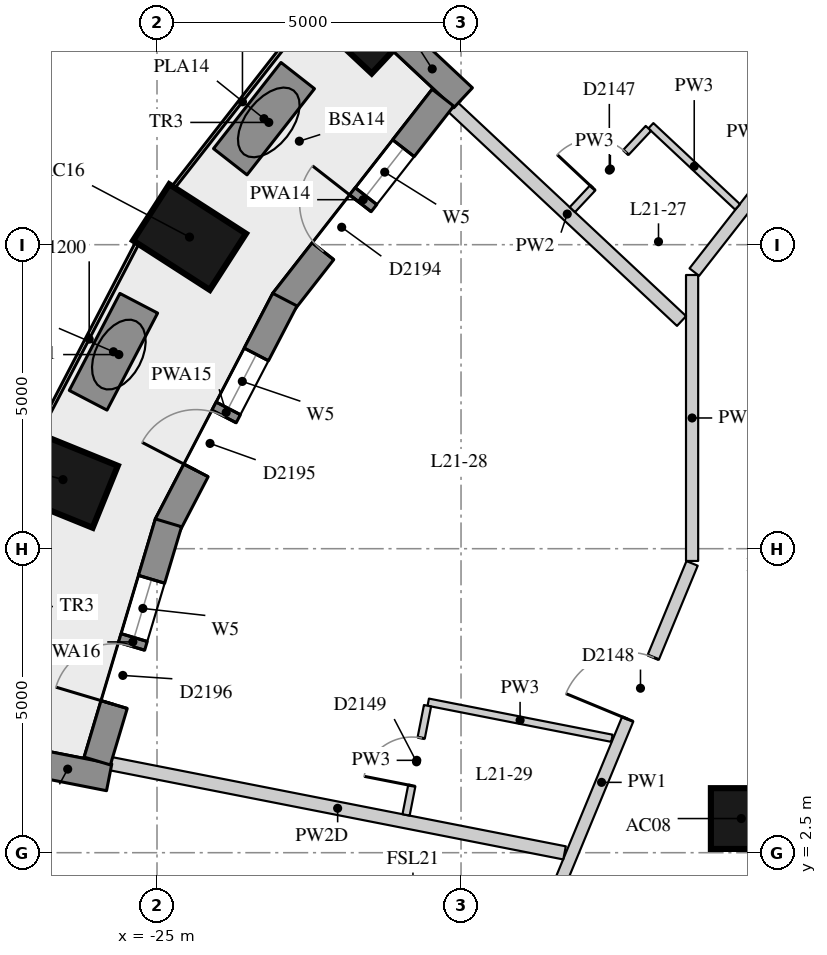
"""IFC4 building model, lengths in metres.
Left out: names, types, materials, properties, quantities, classifications, styles, units other than length and angle.
Written with IfcOpenShell. Run it as: python <this file> out.ifc"""

import sys

from ifc_helpers import new_model, si_unit, direction, frame, frame_2d, origin, origin_2d, place, context, subcontext, project, spatial, rectangle, extrude, element, fill, save


model = new_model("IFC4")
c1 = context("Model", 3, precision=1e-05, world=origin(), true_north=direction((0.0, 1.0)))
c2 = subcontext(c1, "Body", "Model", "MODEL_VIEW")
j1 = project(units=[si_unit("LENGTHUNIT", "METRE"), si_unit("PLANEANGLEUNIT", "RADIAN")], contexts=[c1])
p1 = place(None, origin())
s1 = spatial("IfcSite", under=j1, at=p1, CompositionType="ELEMENT")
p2 = place(p1, origin())
s2 = spatial("IfcBuilding", under=s1, at=p2, CompositionType="ELEMENT")
p3 = place(p2, frame((0.0, 0.0, 77.8)))
s3 = spatial("IfcBuildingStorey", under=s2, at=p3, CompositionType="ELEMENT", Elevation=77.8)
for number, where, z_axis, x_axis in (
    (1, (-21.641, 16.23, 0.0), (0.0, 0.0, 1.0), (-0.73, 0.683, 0.0)),
    (2, (-24.465, 12.625, 0.0), (0.0, 0.0, 1.0), (-0.841, 0.541, 0.0)),
    (3, (-26.546, 8.636, 0.0), (0.0, 0.0, 1.0), (-0.927, 0.376, 0.0)),
):
    element("IfcColumn", number, at=place(p3, frame(where, z_axis=z_axis, x_axis=x_axis)), inside=s3, PredefinedType="COLUMN", context=c2, shape_type="SweptSolid", body=[
        extrude(rectangle(XDim=1.5, YDim=1.1, at=origin_2d()), origin(), (0.0, 0.0, 1.0), 3.3),
    ])
p4 = place(p3, frame((-15.391, 3.062, 0.0), z_axis=(0.0, 0.0, 1.0), x_axis=(1.0, 0.0, 0.0)))
e4 = element("IfcColumn", 4, at=p4, inside=s3, PredefinedType="COLUMN", context=c2, shape_type="SweptSolid", body=[
    extrude(rectangle(XDim=1.0, YDim=1.0, at=origin_2d()), origin(), (0.0, 0.0, 1.0), 3.3),
])
p5 = place(p3, frame((-20.982, 15.866, 0.0), z_axis=(0.0, 0.0, 1.0), x_axis=(0.730062381614, -0.683380508174, 0.0)))
e5 = element("IfcWall", 5, at=p5, inside=s3, PredefinedType="SOLIDWALL", context=c2, shape_type="SweptSolid", body=[
    extrude(rectangle(XDim=1.391, YDim=0.45, at=frame_2d((0.696, 0.0))), origin(), (0.0, 0.0, 1.0), 3.02),
])
p6 = place(p3, frame((-27.151, 4.009, 0.0), z_axis=(0.0, 0.0, 1.0), x_axis=(0.981197182729, -0.1930080014, 0.0)))
e6 = element("IfcWall", 6, at=p6, inside=s3, PredefinedType="SOLIDWALL", context=c2, shape_type="SweptSolid", body=[
    extrude(rectangle(XDim=1.39, YDim=0.45, at=frame_2d((0.695, 0.0))), origin(), (0.0, 0.0, 1.0), 2.47),
])
p7 = place(p3, frame((-20.298, 14.918, 0.0), z_axis=(0.0, 0.0, 1.0), x_axis=(-0.615578403957, -0.788075649022, 0.0)))
e7 = element("IfcWall", 7, at=p7, inside=s3, PredefinedType="SOLIDWALL", context=c2, shape_type="SweptSolid", body=[
    extrude(rectangle(XDim=4.259, YDim=0.45, at=frame_2d((2.129, 0.0))), origin(), (0.0, 0.0, 1.0), 3.02),
])
p8 = place(p7, frame((1.054, 0.0, 0.4)))
e8 = element("IfcOpeningElement", 8, at=p8, cuts=e7, PredefinedType="OPENING", context=c2, shape_type="SweptSolid", body=[
    extrude(rectangle(XDim=1.0, YDim=1.75, at=frame_2d((0.5, 0.875))), frame((0.0, 0.235, 0.0), z_axis=(0.0, -1.0, 0.0), x_axis=(1.0, 0.0, 0.0)), (0.0, 0.0, 1.0), 0.47),
])
p9 = place(p7, frame((2.204, 0.0, 0.0)))
e9 = element("IfcOpeningElement", 9, at=p9, cuts=e7, PredefinedType="OPENING", context=c2, shape_type="SweptSolid", body=[
    extrude(rectangle(XDim=1.0, YDim=2.15, at=frame_2d((0.5, 1.075))), frame((0.0, 0.235, 0.0), z_axis=(0.0, -1.0, 0.0), x_axis=(1.0, 0.0, 0.0)), (0.0, 0.0, 1.0), 0.47),
])
p10 = place(p3, frame((-22.897, 11.597, 0.0), z_axis=(0.0, 0.0, 1.0), x_axis=(-0.461514453451, -0.887132689769, 0.0)))
e10 = element("IfcWall", 10, at=p10, inside=s3, PredefinedType="SOLIDWALL", context=c2, shape_type="SweptSolid", body=[
    extrude(rectangle(XDim=4.183, YDim=0.45, at=frame_2d((2.091, 0.0))), origin(), (0.0, 0.0, 1.0), 3.02),
])
p11 = place(p10, frame((1.016, 0.0, 0.4)))
e11 = element("IfcOpeningElement", 11, at=p11, cuts=e10, PredefinedType="OPENING", context=c2, shape_type="SweptSolid", body=[
    extrude(rectangle(XDim=1.0, YDim=1.75, at=frame_2d((0.5, 0.875))), frame((0.0, 0.235, 0.0), z_axis=(0.0, -1.0, 0.0), x_axis=(1.0, 0.0, 0.0)), (0.0, 0.0, 1.0), 0.47),
])
p12 = place(p10, frame((2.167, 0.0, 0.0)))
e12 = element("IfcOpeningElement", 12, at=p12, cuts=e10, PredefinedType="OPENING", context=c2, shape_type="SweptSolid", body=[
    extrude(rectangle(XDim=1.0, YDim=2.15, at=frame_2d((0.5, 1.075))), frame((0.0, 0.235, 0.0), z_axis=(0.0, -1.0, 0.0), x_axis=(1.0, 0.0, 0.0)), (0.0, 0.0, 1.0), 0.47),
])
p13 = place(p3, frame((-24.812, 7.925, 0.0), z_axis=(0.0, 0.0, 1.0), x_axis=(-0.286389028326, -0.95811341941, 0.0)))
e13 = element("IfcWall", 13, at=p13, inside=s3, PredefinedType="SOLIDWALL", context=c2, shape_type="SweptSolid", body=[
    extrude(rectangle(XDim=4.088, YDim=0.45, at=frame_2d((2.044, 0.0))), origin(), (0.0, 0.0, 1.0), 3.02),
])
p14 = place(p13, frame((0.969, 0.0, 0.4)))
e14 = element("IfcOpeningElement", 14, at=p14, cuts=e13, PredefinedType="OPENING", context=c2, shape_type="SweptSolid", body=[
    extrude(rectangle(XDim=1.0, YDim=1.75, at=frame_2d((0.5, 0.875))), frame((0.0, 0.235, 0.0), z_axis=(0.0, -1.0, 0.0), x_axis=(1.0, 0.0, 0.0)), (0.0, 0.0, 1.0), 0.47),
])
p15 = place(p13, frame((2.119, 0.0, 0.0)))
e15 = element("IfcOpeningElement", 15, at=p15, cuts=e13, PredefinedType="OPENING", context=c2, shape_type="SweptSolid", body=[
    extrude(rectangle(XDim=1.0, YDim=2.15, at=frame_2d((0.5, 1.075))), frame((0.0, 0.235, 0.0), z_axis=(0.0, -1.0, 0.0), x_axis=(1.0, 0.0, 0.0)), (0.0, 0.0, 1.0), 0.47),
])
p16 = place(p3, frame((-22.686, 15.281, 0.0), z_axis=(0.0, 0.0, 1.0), x_axis=(-0.616622746332, -0.787258781282, 0.0)))
e16 = element("IfcWall", 16, at=p16, inside=s3, PredefinedType="USERDEFINED", context=c2, shape_type="SweptSolid", body=[
    extrude(rectangle(XDim=1.8, YDim=0.7, at=frame_2d((0.9, 0.0))), origin(), (0.0, 0.0, 1.0), 0.75),
])
p17 = place(p3, frame((-25.3, 11.537, 0.0), z_axis=(0.0, 0.0, 1.0), x_axis=(-0.462501112253, -0.886618701114, 0.0)))
e17 = element("IfcWall", 17, at=p17, inside=s3, PredefinedType="USERDEFINED", context=c2, shape_type="SweptSolid", body=[
    extrude(rectangle(XDim=1.8, YDim=0.7, at=frame_2d((0.9, 0.0))), origin(), (0.0, 0.0, 1.0), 0.75),
])
p18 = place(p3, frame((-19.177, 0.056, 0.0), z_axis=(0.0, 0.0, 1.0), x_axis=(0.382011450526, 0.924157590277, 0.0)))
e18 = element("IfcWall", 18, at=p18, inside=s3, PredefinedType="PARTITIONING", context=c2, shape_type="SweptSolid", body=[
    extrude(rectangle(XDim=7.794, YDim=0.2, at=frame_2d((3.897, 0.0))), origin(), (0.0, 0.0, 1.0), 3.02),
])
p19 = place(p18, frame((5.022, 0.0, 0.0)))
e19 = element("IfcOpeningElement", 19, at=p19, cuts=e18, PredefinedType="OPENING", context=c2, shape_type="SweptSolid", body=[
    extrude(rectangle(XDim=1.1, YDim=2.1, at=frame_2d((0.55, 1.05))), frame((0.0, 0.11, 0.0), z_axis=(0.0, -1.0, 0.0), x_axis=(1.0, 0.0, 0.0)), (0.0, 0.0, 1.0), 0.22),
])
p20 = place(p18, frame((0.22, 0.0, 0.0)))
e20 = element("IfcOpeningElement", 20, at=p20, cuts=e18, PredefinedType="OPENING", context=c2, shape_type="SweptSolid", body=[
    extrude(rectangle(XDim=1.1, YDim=2.1, at=frame_2d((0.55, 1.05))), frame((0.0, 0.11, 0.0), z_axis=(0.0, -1.0, 0.0), x_axis=(1.0, 0.0, 0.0)), (0.0, 0.0, 1.0), 0.22),
])
p21 = place(p3, frame((-16.2, 7.298, 0.0), z_axis=(0.0, 0.0, 1.0), x_axis=(0.0, 1.0, 0.0)))
e21 = element("IfcWall", 21, at=p21, inside=s3, PredefinedType="PARTITIONING", context=c2, shape_type="SweptSolid", body=[
    extrude(rectangle(XDim=4.703, YDim=0.2, at=frame_2d((2.352, 0.0))), origin(), (0.0, 0.0, 1.0), 3.02),
])
p22 = place(p3, frame((-16.163, 12.049, 0.0), z_axis=(0.0, 0.0, 1.0), x_axis=(0.6157435057, 0.787946657578, 0.0)))
e22 = element("IfcWall", 22, at=p22, inside=s3, PredefinedType="PARTITIONING", context=c2, shape_type="SweptSolid", body=[
    extrude(rectangle(XDim=4.477, YDim=0.2, at=frame_2d((2.239, 0.0))), origin(), (0.0, 0.0, 1.0), 3.02),
])
p23 = place(p3, frame((-20.133, 14.764, 0.0), z_axis=(0.0, 0.0, 1.0), x_axis=(0.730092856427, -0.683347950165, 0.0)))
e23 = element("IfcWall", 23, at=p23, inside=s3, PredefinedType="PARTITIONING", context=c2, shape_type="SweptSolid", body=[
    extrude(rectangle(XDim=5.15, YDim=0.22, at=frame_2d((2.575, 0.0))), origin(), (0.0, 0.0, 1.0), 3.02),
])
p24 = place(p3, frame((-25.761, 3.964, 0.0), z_axis=(0.0, 0.0, 1.0), x_axis=(0.981212489184, -0.192930171486, 0.0)))
e24 = element("IfcWall", 24, at=p24, inside=s3, PredefinedType="PARTITIONING", context=c2, shape_type="SweptSolid", body=[
    extrude(rectangle(XDim=7.606, YDim=0.22, at=frame_2d((3.803, 0.0))), origin(), (0.0, 0.0, 1.0), 2.47),
])
p25 = place(p3, frame((-15.452, 13.122, 0.0), z_axis=(0.0, 0.0, 1.0), x_axis=(-0.730035995084, 0.683408696083, 0.0)))
e25 = element("IfcWall", 25, at=p25, inside=s3, PredefinedType="PARTITIONING", context=c2, shape_type="SweptSolid", body=[
    extrude(rectangle(XDim=1.953, YDim=0.12, at=frame_2d((0.977, 0.0))), origin(), (0.0, 0.0, 1.0), 3.02),
])
p26 = place(p3, frame((-17.518, 4.382, 0.0), z_axis=(0.0, 0.0, 1.0), x_axis=(-0.981212916867, 0.192927996342, 0.0)))
e26 = element("IfcWall", 26, at=p26, inside=s3, PredefinedType="PARTITIONING", context=c2, shape_type="SweptSolid", body=[
    extrude(rectangle(XDim=3.079, YDim=0.12, at=frame_2d((1.54, 0.0))), origin(), (0.0, 0.0, 1.0), 3.02),
])
p27 = place(p3, frame((-16.919, 14.413, 0.0), z_axis=(0.0, 0.0, 1.0), x_axis=(-0.683306289544, -0.730131847456, 0.0)))
e27 = element("IfcWall", 27, at=p27, inside=s3, PredefinedType="PARTITIONING", context=c2, shape_type="SweptSolid", body=[
    extrude(rectangle(XDim=1.83, YDim=0.12, at=frame_2d((0.915, 0.0))), origin(), (0.0, 0.0, 1.0), 3.02),
])
p28 = place(p27, frame((0.54, 0.0, 0.0)))
e28 = element("IfcOpeningElement", 28, at=p28, cuts=e27, PredefinedType="OPENING", context=c2, shape_type="SweptSolid", body=[
    extrude(rectangle(XDim=0.8, YDim=2.1, at=frame_2d((0.4, 1.05))), frame((0.0, 0.07, 0.0), z_axis=(0.0, -1.0, 0.0), x_axis=(1.0, 0.0, 0.0)), (0.0, 0.0, 1.0), 0.14),
])
p29 = place(p3, frame((-20.551, 4.917, 0.0), z_axis=(0.0, 0.0, 1.0), x_axis=(-0.19288291118, -0.981221780524, 0.0)))
e29 = element("IfcWall", 29, at=p29, inside=s3, PredefinedType="PARTITIONING", context=c2, shape_type="SweptSolid", body=[
    extrude(rectangle(XDim=1.83, YDim=0.12, at=frame_2d((0.915, 0.0))), origin(), (0.0, 0.0, 1.0), 3.02),
])
p30 = place(p29, frame((0.54, 0.0, 0.0)))
e30 = element("IfcOpeningElement", 30, at=p30, cuts=e29, PredefinedType="OPENING", context=c2, shape_type="SweptSolid", body=[
    extrude(rectangle(XDim=0.8, YDim=2.1, at=frame_2d((0.4, 1.05))), frame((0.0, 0.07, 0.0), z_axis=(0.0, -1.0, 0.0), x_axis=(1.0, 0.0, 0.0)), (0.0, 0.0, 1.0), 0.14),
])
p31 = place(p8, origin())
e31 = element("IfcWindow", 31, at=p31, inside=s3, PartitioningType="SINGLE_PANEL", PredefinedType="WINDOW", context=c2, shape_type="SweptSolid", body=[
    extrude(rectangle(XDim=1.0, YDim=1.75, at=frame_2d((0.5, 0.875))), frame((0.0, 0.035, 0.0), z_axis=(0.0, -1.0, 0.0), x_axis=(1.0, 0.0, 0.0)), (0.0, 0.0, 1.0), 0.06),
])
fill(e8, e31)
p32 = place(p9, frame((1.0, 0.0, 0.0), z_axis=(0.0, 0.0, 1.0), x_axis=(-1.0, 0.0, 0.0)))
e32 = element("IfcDoor", 32, at=p32, inside=s3, OperationType="SINGLE_SWING_RIGHT", PredefinedType="DOOR", context=c2, shape_type="SweptSolid", body=[
    extrude(rectangle(XDim=1.0, YDim=2.15, at=frame_2d((0.5, 1.075))), frame((0.0, 0.075, 0.0), z_axis=(0.0, -1.0, 0.0), x_axis=(1.0, 0.0, 0.0)), (0.0, 0.0, 1.0), 0.05),
])
fill(e9, e32)
p33 = place(p11, origin())
e33 = element("IfcWindow", 33, at=p33, inside=s3, PartitioningType="SINGLE_PANEL", PredefinedType="WINDOW", context=c2, shape_type="SweptSolid", body=[
    extrude(rectangle(XDim=1.0, YDim=1.75, at=frame_2d((0.5, 0.875))), frame((0.0, 0.035, 0.0), z_axis=(0.0, -1.0, 0.0), x_axis=(1.0, 0.0, 0.0)), (0.0, 0.0, 1.0), 0.06),
])
fill(e11, e33)
p34 = place(p12, frame((1.0, 0.0, 0.0), z_axis=(0.0, 0.0, 1.0), x_axis=(-1.0, 0.0, 0.0)))
e34 = element("IfcDoor", 34, at=p34, inside=s3, OperationType="SINGLE_SWING_LEFT", PredefinedType="DOOR", context=c2, shape_type="SweptSolid", body=[
    extrude(rectangle(XDim=1.0, YDim=2.15, at=frame_2d((0.5, 1.075))), frame((0.0, 0.075, 0.0), z_axis=(0.0, -1.0, 0.0), x_axis=(1.0, 0.0, 0.0)), (0.0, 0.0, 1.0), 0.05),
])
fill(e12, e34)
p35 = place(p14, origin())
e35 = element("IfcWindow", 35, at=p35, inside=s3, PartitioningType="SINGLE_PANEL", PredefinedType="WINDOW", context=c2, shape_type="SweptSolid", body=[
    extrude(rectangle(XDim=1.0, YDim=1.75, at=frame_2d((0.5, 0.875))), frame((0.0, 0.035, 0.0), z_axis=(0.0, -1.0, 0.0), x_axis=(1.0, 0.0, 0.0)), (0.0, 0.0, 1.0), 0.06),
])
fill(e14, e35)
p36 = place(p15, frame((1.0, 0.0, 0.0), z_axis=(0.0, 0.0, 1.0), x_axis=(-1.0, 0.0, 0.0)))
e36 = element("IfcDoor", 36, at=p36, inside=s3, OperationType="SINGLE_SWING_LEFT", PredefinedType="DOOR", context=c2, shape_type="SweptSolid", body=[
    extrude(rectangle(XDim=1.0, YDim=2.15, at=frame_2d((0.5, 1.075))), frame((0.0, 0.075, 0.0), z_axis=(0.0, -1.0, 0.0), x_axis=(1.0, 0.0, 0.0)), (0.0, 0.0, 1.0), 0.05),
])
fill(e15, e36)
p37 = place(p28, origin())
e37 = element("IfcDoor", 37, at=p37, inside=s3, OperationType="SINGLE_SWING_LEFT", PredefinedType="DOOR", context=c2, shape_type="SweptSolid", body=[
    extrude(rectangle(XDim=0.8, YDim=2.1, at=frame_2d((0.4, 1.05))), frame((0.0, 0.025, 0.0), z_axis=(0.0, -1.0, 0.0), x_axis=(1.0, 0.0, 0.0)), (0.0, 0.0, 1.0), 0.05),
])
fill(e28, e37)
p38 = place(p19, origin())
e38 = element("IfcDoor", 38, at=p38, inside=s3, OperationType="SINGLE_SWING_LEFT", PredefinedType="DOOR", context=c2, shape_type="SweptSolid", body=[
    extrude(rectangle(XDim=1.1, YDim=2.1, at=frame_2d((0.55, 1.05))), frame((0.0, 0.025, 0.0), z_axis=(0.0, -1.0, 0.0), x_axis=(1.0, 0.0, 0.0)), (0.0, 0.0, 1.0), 0.05),
])
fill(e19, e38)
p39 = place(p30, origin())
e39 = element("IfcDoor", 39, at=p39, inside=s3, OperationType="SINGLE_SWING_LEFT", PredefinedType="DOOR", context=c2, shape_type="SweptSolid", body=[
    extrude(rectangle(XDim=0.8, YDim=2.1, at=frame_2d((0.4, 1.05))), frame((0.0, 0.025, 0.0), z_axis=(0.0, -1.0, 0.0), x_axis=(1.0, 0.0, 0.0)), (0.0, 0.0, 1.0), 0.05),
])
fill(e30, e39)
save(model, sys.argv[1])
